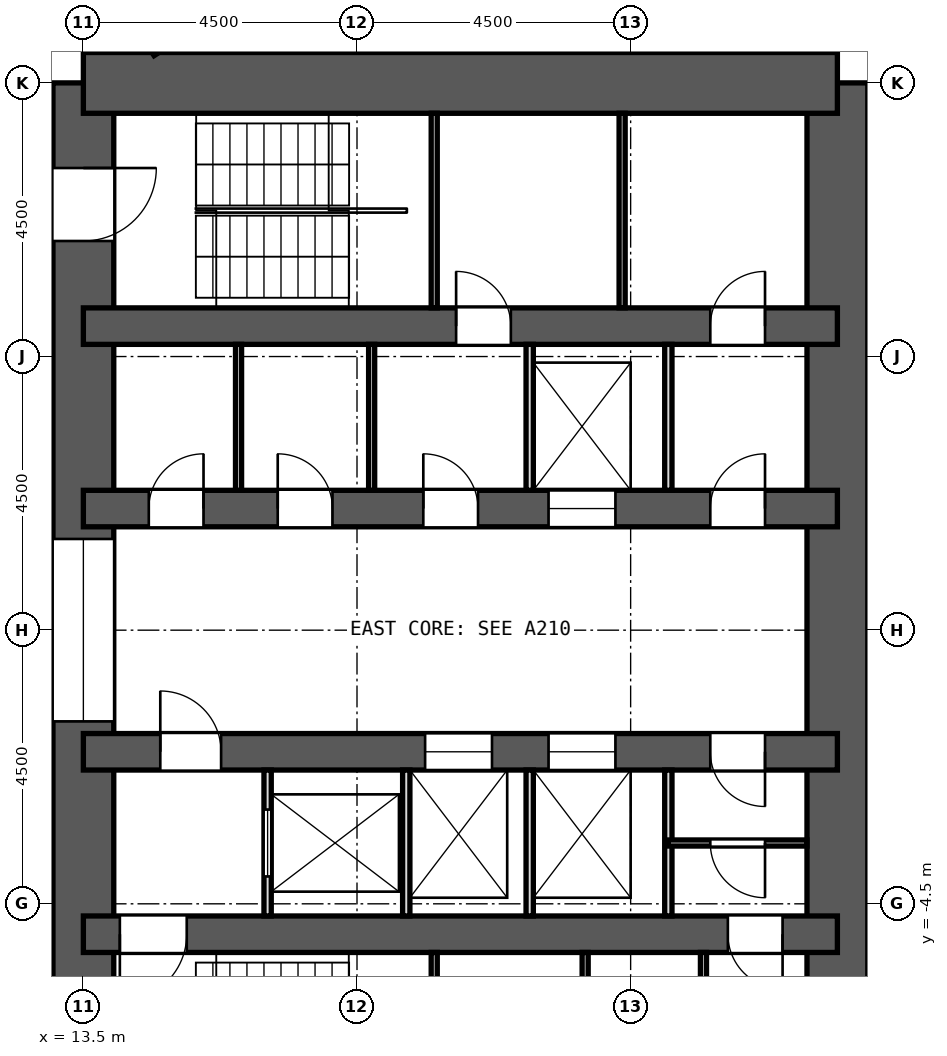
"""IFC4 building model, lengths in metres.
Left out: names, types, materials, properties, quantities, classifications, styles, units other than length and angle.
Written with IfcOpenShell. Run it as: python <this file> out.ifc"""

import sys

from ifc_helpers import new_model, si_unit, direction, frame, frame_2d, origin, place, context, subcontext, project, spatial, rectangle, extrude, element, fill, save


model = new_model("IFC4")
c1 = context("Model", 3, precision=1e-05, world=origin(), true_north=direction((0.0, 1.0)))
c2 = subcontext(c1, "Body", "Model", "MODEL_VIEW")
j1 = project(units=[si_unit("LENGTHUNIT", "METRE"), si_unit("PLANEANGLEUNIT", "RADIAN")], contexts=[c1])
p1 = place(None, origin())
s1 = spatial("IfcSite", under=j1, at=p1, CompositionType="ELEMENT")
p2 = place(p1, origin())
s2 = spatial("IfcBuilding", under=s1, at=p2, CompositionType="ELEMENT")
p3 = place(p2, frame((0.0, 0.0, 36.2)))
s3 = spatial("IfcBuildingStorey", under=s2, at=p3, CompositionType="ELEMENT", Elevation=36.2)
p4 = place(p3, frame((13.5, -9.0, 0.0), z_axis=(0.0, 0.0, 1.0), x_axis=(0.0, 1.0, 0.0)))
e1 = element("IfcWall", 1, at=p4, inside=s3, PredefinedType="SHEAR", context=c2, shape_type="SweptSolid", body=[
    extrude(rectangle(XDim=18.0, YDim=1.0, at=frame_2d((9.0, 0.0))), origin(), (0.0, 0.0, 1.0), 3.3),
])
p5 = place(p4, frame((15.4, 0.0, 0.0)))
e2 = element("IfcOpeningElement", 2, at=p5, cuts=e1, PredefinedType="OPENING", context=c2, shape_type="SweptSolid", body=[
    extrude(rectangle(XDim=1.2, YDim=2.1, at=frame_2d((0.6, 1.05))), frame((0.0, 0.512, 0.0), z_axis=(0.0, -1.0, 0.0), x_axis=(1.0, 0.0, 0.0)), (0.0, 0.0, 1.0), 1.024),
])
p6 = place(p4, frame((1.4, 0.0, 0.0)))
e3 = element("IfcOpeningElement", 3, at=p6, cuts=e1, PredefinedType="OPENING", context=c2, shape_type="SweptSolid", body=[
    extrude(rectangle(XDim=1.2, YDim=2.1, at=frame_2d((0.6, 1.05))), frame((0.0, 0.512, 0.0), z_axis=(0.0, -1.0, 0.0), x_axis=(1.0, 0.0, 0.0)), (0.0, 0.0, 1.0), 1.024),
])
p7 = place(p4, frame((7.5, 0.0, 0.0)))
e4 = element("IfcOpeningElement", 4, at=p7, cuts=e1, PredefinedType="OPENING", context=c2, shape_type="SweptSolid", body=[
    extrude(rectangle(XDim=3.0, YDim=2.4, at=frame_2d((1.5, 1.2))), frame((0.0, 0.512, 0.0), z_axis=(0.0, -1.0, 0.0), x_axis=(1.0, 0.0, 0.0)), (0.0, 0.0, 1.0), 1.024),
])
p8 = place(p3, frame((25.9, -9.0, 0.0), z_axis=(0.0, 0.0, 1.0), x_axis=(0.0, 1.0, 0.0)))
e5 = element("IfcWall", 5, at=p8, inside=s3, PredefinedType="SHEAR", context=c2, shape_type="SweptSolid", body=[
    extrude(rectangle(XDim=18.0, YDim=1.0, at=frame_2d((9.0, 0.0))), origin(), (0.0, 0.0, 1.0), 3.3),
])
p9 = place(p3, frame((13.5, 9.0, 0.0), z_axis=(0.0, 0.0, 1.0), x_axis=(1.0, 0.0, 0.0)))
e6 = element("IfcWall", 6, at=p9, inside=s3, PredefinedType="SHEAR", context=c2, shape_type="SweptSolid", body=[
    extrude(rectangle(XDim=12.4, YDim=1.0, at=frame_2d((6.2, 0.0))), origin(), (0.0, 0.0, 1.0), 3.3),
])
p10 = place(p3, frame((13.5, 5.0, 0.0), z_axis=(0.0, 0.0, 1.0), x_axis=(1.0, 0.0, 0.0)))
e7 = element("IfcWall", 7, at=p10, inside=s3, PredefinedType="SHEAR", context=c2, shape_type="SweptSolid", body=[
    extrude(rectangle(XDim=12.4, YDim=0.6, at=frame_2d((6.2, 0.0))), origin(), (0.0, 0.0, 1.0), 3.3),
])
p11 = place(p10, frame((6.13, 0.0, 0.0)))
e8 = element("IfcOpeningElement", 8, at=p11, cuts=e7, PredefinedType="OPENING", context=c2, shape_type="SweptSolid", body=[
    extrude(rectangle(XDim=0.9, YDim=2.1, at=frame_2d((0.45, 1.05))), frame((0.0, 0.312, 0.0), z_axis=(0.0, -1.0, 0.0), x_axis=(1.0, 0.0, 0.0)), (0.0, 0.0, 1.0), 0.624),
])
p12 = place(p10, frame((10.31, 0.0, 0.0)))
e9 = element("IfcOpeningElement", 9, at=p12, cuts=e7, PredefinedType="OPENING", context=c2, shape_type="SweptSolid", body=[
    extrude(rectangle(XDim=0.9, YDim=2.1, at=frame_2d((0.45, 1.05))), frame((0.0, 0.312, 0.0), z_axis=(0.0, -1.0, 0.0), x_axis=(1.0, 0.0, 0.0)), (0.0, 0.0, 1.0), 0.624),
])
p13 = place(p3, frame((13.5, -5.0, 0.0), z_axis=(0.0, 0.0, 1.0), x_axis=(1.0, 0.0, 0.0)))
e10 = element("IfcWall", 10, at=p13, inside=s3, PredefinedType="SHEAR", context=c2, shape_type="SweptSolid", body=[
    extrude(rectangle(XDim=12.4, YDim=0.6, at=frame_2d((6.2, 0.0))), origin(), (0.0, 0.0, 1.0), 3.3),
])
p14 = place(p13, frame((10.599, 0.0, 0.0)))
e11 = element("IfcOpeningElement", 11, at=p14, cuts=e10, PredefinedType="OPENING", context=c2, shape_type="SweptSolid", body=[
    extrude(rectangle(XDim=0.9, YDim=2.1, at=frame_2d((0.45, 1.05))), frame((0.0, 0.312, 0.0), z_axis=(0.0, -1.0, 0.0), x_axis=(1.0, 0.0, 0.0)), (0.0, 0.0, 1.0), 0.624),
])
p15 = place(p13, frame((0.6, 0.0, 0.0)))
e12 = element("IfcOpeningElement", 12, at=p15, cuts=e10, PredefinedType="OPENING", context=c2, shape_type="SweptSolid", body=[
    extrude(rectangle(XDim=1.1, YDim=2.1, at=frame_2d((0.55, 1.05))), frame((0.0, 0.312, 0.0), z_axis=(0.0, -1.0, 0.0), x_axis=(1.0, 0.0, 0.0)), (0.0, 0.0, 1.0), 0.624),
])
p16 = place(p3, frame((13.5, 2.0, 0.0), z_axis=(0.0, 0.0, 1.0), x_axis=(1.0, 0.0, 0.0)))
e13 = element("IfcWall", 13, at=p16, inside=s3, PredefinedType="SHEAR", context=c2, shape_type="SweptSolid", body=[
    extrude(rectangle(XDim=12.4, YDim=0.6, at=frame_2d((6.2, 0.0))), origin(), (0.0, 0.0, 1.0), 3.3),
])
p17 = place(p16, frame((7.65, 0.0, 0.0)))
e14 = element("IfcOpeningElement", 14, at=p17, cuts=e13, PredefinedType="OPENING", context=c2, shape_type="SweptSolid", body=[
    extrude(rectangle(XDim=1.1, YDim=2.1, at=frame_2d((0.55, 1.05))), frame((0.0, 0.312, 0.0), z_axis=(0.0, -1.0, 0.0), x_axis=(1.0, 0.0, 0.0)), (0.0, 0.0, 1.0), 0.624),
])
p18 = place(p16, frame((1.076, 0.0, 0.0)))
e15 = element("IfcOpeningElement", 15, at=p18, cuts=e13, PredefinedType="OPENING", context=c2, shape_type="SweptSolid", body=[
    extrude(rectangle(XDim=0.9, YDim=2.1, at=frame_2d((0.45, 1.05))), frame((0.0, 0.312, 0.0), z_axis=(0.0, -1.0, 0.0), x_axis=(1.0, 0.0, 0.0)), (0.0, 0.0, 1.0), 0.624),
])
p19 = place(p16, frame((3.196, 0.0, 0.0)))
e16 = element("IfcOpeningElement", 16, at=p19, cuts=e13, PredefinedType="OPENING", context=c2, shape_type="SweptSolid", body=[
    extrude(rectangle(XDim=0.9, YDim=2.1, at=frame_2d((0.45, 1.05))), frame((0.0, 0.312, 0.0), z_axis=(0.0, -1.0, 0.0), x_axis=(1.0, 0.0, 0.0)), (0.0, 0.0, 1.0), 0.624),
])
p20 = place(p16, frame((5.59, 0.0, 0.0)))
e17 = element("IfcOpeningElement", 17, at=p20, cuts=e13, PredefinedType="OPENING", context=c2, shape_type="SweptSolid", body=[
    extrude(rectangle(XDim=0.9, YDim=2.1, at=frame_2d((0.45, 1.05))), frame((0.0, 0.312, 0.0), z_axis=(0.0, -1.0, 0.0), x_axis=(1.0, 0.0, 0.0)), (0.0, 0.0, 1.0), 0.624),
])
p21 = place(p16, frame((10.31, 0.0, 0.0)))
e18 = element("IfcOpeningElement", 18, at=p21, cuts=e13, PredefinedType="OPENING", context=c2, shape_type="SweptSolid", body=[
    extrude(rectangle(XDim=0.9, YDim=2.1, at=frame_2d((0.45, 1.05))), frame((0.0, 0.312, 0.0), z_axis=(0.0, -1.0, 0.0), x_axis=(1.0, 0.0, 0.0)), (0.0, 0.0, 1.0), 0.624),
])
p22 = place(p3, frame((13.5, -2.0, 0.0), z_axis=(0.0, 0.0, 1.0), x_axis=(1.0, 0.0, 0.0)))
e19 = element("IfcWall", 19, at=p22, inside=s3, PredefinedType="SHEAR", context=c2, shape_type="SweptSolid", body=[
    extrude(rectangle(XDim=12.4, YDim=0.6, at=frame_2d((6.2, 0.0))), origin(), (0.0, 0.0, 1.0), 3.3),
])
p23 = place(p22, frame((5.62, 0.0, 0.0)))
e20 = element("IfcOpeningElement", 20, at=p23, cuts=e19, PredefinedType="OPENING", context=c2, shape_type="SweptSolid", body=[
    extrude(rectangle(XDim=1.1, YDim=2.1, at=frame_2d((0.55, 1.05))), frame((0.0, 0.312, 0.0), z_axis=(0.0, -1.0, 0.0), x_axis=(1.0, 0.0, 0.0)), (0.0, 0.0, 1.0), 0.624),
])
p24 = place(p22, frame((7.65, 0.0, 0.0)))
e21 = element("IfcOpeningElement", 21, at=p24, cuts=e19, PredefinedType="OPENING", context=c2, shape_type="SweptSolid", body=[
    extrude(rectangle(XDim=1.1, YDim=2.1, at=frame_2d((0.55, 1.05))), frame((0.0, 0.312, 0.0), z_axis=(0.0, -1.0, 0.0), x_axis=(1.0, 0.0, 0.0)), (0.0, 0.0, 1.0), 0.624),
])
p25 = place(p22, frame((1.265, 0.0, 0.0)))
e22 = element("IfcOpeningElement", 22, at=p25, cuts=e19, PredefinedType="OPENING", context=c2, shape_type="SweptSolid", body=[
    extrude(rectangle(XDim=1.0, YDim=2.1, at=frame_2d((0.5, 1.05))), frame((0.0, 0.312, 0.0), z_axis=(0.0, -1.0, 0.0), x_axis=(1.0, 0.0, 0.0)), (0.0, 0.0, 1.0), 0.624),
])
p26 = place(p22, frame((10.31, 0.0, 0.0)))
e23 = element("IfcOpeningElement", 23, at=p26, cuts=e19, PredefinedType="OPENING", context=c2, shape_type="SweptSolid", body=[
    extrude(rectangle(XDim=0.9, YDim=2.1, at=frame_2d((0.45, 1.05))), frame((0.0, 0.312, 0.0), z_axis=(0.0, -1.0, 0.0), x_axis=(1.0, 0.0, 0.0)), (0.0, 0.0, 1.0), 0.624),
])
p27 = place(p3, frame((27.523, 7.971, 0.0), z_axis=(0.0, 0.0, 1.0), x_axis=(-0.342028474173, 0.939689588564, 0.0)))
e24 = element("IfcWall", 24, at=p27, inside=s3, PredefinedType="SOLIDWALL", context=c2, shape_type="SweptSolid", body=[
    extrude(rectangle(XDim=3.846, YDim=0.6, at=frame_2d((1.923, 0.0))), origin(), (0.0, 0.0, 1.0), 2.75),
])
p28 = place(p3, frame((14.629, 9.5, 0.0), z_axis=(0.0, 0.0, 1.0), x_axis=(0.838764779401, 0.544493934619, 0.0)))
e25 = element("IfcWall", 25, at=p28, inside=s3, PredefinedType="PARTITIONING", context=c2, shape_type="SweptSolid", body=[
    extrude(rectangle(XDim=0.92, YDim=0.125, at=frame_2d((0.46, 0.0))), origin(), (0.0, 0.0, 1.0), 2.75),
])
for number, where, z_axis, x_axis in (
    (26, (16.052, 2.3, 0.0), (0.0, 0.0, 1.0), (0.0, 1.0, 0.0)),
    (27, (18.241, 2.3, 0.0), (0.0, 0.0, 1.0), (0.0, 1.0, 0.0)),
):
    element("IfcWall", number, at=place(p3, frame(where, z_axis=z_axis, x_axis=x_axis)), inside=s3, PredefinedType="PARTITIONING", context=c2, shape_type="SweptSolid", body=[
        extrude(rectangle(XDim=2.4, YDim=0.1, at=frame_2d((1.2, 0.0))), origin(), (0.0, 0.0, 1.0), 2.75),
    ])
for number, where, z_axis, x_axis in (
    (28, (20.84, 2.3, 0.0), (0.0, 0.0, 1.0), (0.0, 1.0, 0.0)),
    (29, (23.12, 2.3, 0.0), (0.0, 0.0, 1.0), (0.0, 1.0, 0.0)),
):
    element("IfcWall", number, at=place(p3, frame(where, z_axis=z_axis, x_axis=x_axis)), inside=s3, PredefinedType="PARTITIONING", context=c2, shape_type="SweptSolid", body=[
        extrude(rectangle(XDim=2.4, YDim=0.12, at=frame_2d((1.2, 0.0))), origin(), (0.0, 0.0, 1.0), 2.75),
    ])
p29 = place(p3, frame((16.53, -4.7, 0.0), z_axis=(0.0, 0.0, 1.0), x_axis=(0.0, 1.0, 0.0)))
e30 = element("IfcWall", 30, at=p29, inside=s3, PredefinedType="PARTITIONING", context=c2, shape_type="SweptSolid", body=[
    extrude(rectangle(XDim=2.4, YDim=0.12, at=frame_2d((1.2, 0.0))), origin(), (0.0, 0.0, 1.0), 2.75),
])
p30 = place(p29, frame((0.65, 0.0, 0.0)))
e31 = element("IfcOpeningElement", 31, at=p30, cuts=e30, PredefinedType="OPENING", context=c2, shape_type="SweptSolid", body=[
    extrude(rectangle(XDim=1.1, YDim=2.1, at=frame_2d((0.55, 1.05))), frame((0.0, 0.072, 0.0), z_axis=(0.0, -1.0, 0.0), x_axis=(1.0, 0.0, 0.0)), (0.0, 0.0, 1.0), 0.144),
])
for number, where, z_axis, x_axis in (
    (32, (18.81, -4.7, 0.0), (0.0, 0.0, 1.0), (0.0, 1.0, 0.0)),
    (33, (20.84, -4.7, 0.0), (0.0, 0.0, 1.0), (0.0, 1.0, 0.0)),
    (34, (23.12, -4.7, 0.0), (0.0, 0.0, 1.0), (0.0, 1.0, 0.0)),
):
    element("IfcWall", number, at=place(p3, frame(where, z_axis=z_axis, x_axis=x_axis)), inside=s3, PredefinedType="PARTITIONING", context=c2, shape_type="SweptSolid", body=[
        extrude(rectangle(XDim=2.4, YDim=0.12, at=frame_2d((1.2, 0.0))), origin(), (0.0, 0.0, 1.0), 2.75),
    ])
p31 = place(p3, frame((23.12, -3.5, 0.0), z_axis=(0.0, 0.0, 1.0), x_axis=(1.0, 0.0, 0.0)))
e35 = element("IfcWall", 35, at=p31, inside=s3, PredefinedType="PARTITIONING", context=c2, shape_type="SweptSolid", body=[
    extrude(rectangle(XDim=2.28, YDim=0.1, at=frame_2d((1.14, 0.0))), origin(), (0.0, 0.0, 1.0), 2.75),
])
p32 = place(p31, frame((0.69, 0.0, 0.0)))
e36 = element("IfcOpeningElement", 36, at=p32, cuts=e35, PredefinedType="OPENING", context=c2, shape_type="SweptSolid", body=[
    extrude(rectangle(XDim=0.9, YDim=2.1, at=frame_2d((0.45, 1.05))), frame((0.0, 0.062, 0.0), z_axis=(0.0, -1.0, 0.0), x_axis=(1.0, 0.0, 0.0)), (0.0, 0.0, 1.0), 0.124),
])
for number, where, z_axis, x_axis in (
    (37, (19.27, 5.3, 0.0), (0.0, 0.0, 1.0), (0.0, 1.0, 0.0)),
    (38, (22.36, 5.3, 0.0), (0.0, 0.0, 1.0), (0.0, 1.0, 0.0)),
    (39, (19.27, -8.5, 0.0), (0.0, 0.0, 1.0), (0.0, 1.0, 0.0)),
):
    element("IfcWall", number, at=place(p3, frame(where, z_axis=z_axis, x_axis=x_axis)), inside=s3, PredefinedType="PARTITIONING", context=c2, shape_type="SweptSolid", body=[
        extrude(rectangle(XDim=3.2, YDim=0.1, at=frame_2d((1.6, 0.0))), origin(), (0.0, 0.0, 1.0), 2.75),
    ])
p33 = place(p3, frame((21.752, -8.5, 0.0), z_axis=(0.0, 0.0, 1.0), x_axis=(0.0, 1.0, 0.0)))
e40 = element("IfcWall", 40, at=p33, inside=s3, PredefinedType="PARTITIONING", context=c2, shape_type="SweptSolid", body=[
    extrude(rectangle(XDim=3.2, YDim=0.1, at=frame_2d((1.6, 0.0))), origin(), (0.0, 0.0, 1.0), 2.75),
])
p34 = place(p33, frame((1.15, 0.0, 0.0)))
e41 = element("IfcOpeningElement", 41, at=p34, cuts=e40, PredefinedType="OPENING", context=c2, shape_type="SweptSolid", body=[
    extrude(rectangle(XDim=0.9, YDim=2.1, at=frame_2d((0.45, 1.05))), frame((0.0, 0.062, 0.0), z_axis=(0.0, -1.0, 0.0), x_axis=(1.0, 0.0, 0.0)), (0.0, 0.0, 1.0), 0.124),
])
p35 = place(p3, frame((23.698, -8.5, 0.0), z_axis=(0.0, 0.0, 1.0), x_axis=(0.0, 1.0, 0.0)))
e42 = element("IfcWall", 42, at=p35, inside=s3, PredefinedType="PARTITIONING", context=c2, shape_type="SweptSolid", body=[
    extrude(rectangle(XDim=3.2, YDim=0.1, at=frame_2d((1.6, 0.0))), origin(), (0.0, 0.0, 1.0), 2.75),
])
p36 = place(p35, frame((1.15, 0.0, 0.0)))
e43 = element("IfcOpeningElement", 43, at=p36, cuts=e42, PredefinedType="OPENING", context=c2, shape_type="SweptSolid", body=[
    extrude(rectangle(XDim=0.9, YDim=2.1, at=frame_2d((0.45, 1.05))), frame((0.0, 0.062, 0.0), z_axis=(0.0, -1.0, 0.0), x_axis=(1.0, 0.0, 0.0)), (0.0, 0.0, 1.0), 0.124),
])
p37 = place(p17, origin())
e44 = element("IfcDoor", 44, at=p37, inside=s3, OperationType="DOUBLE_DOOR_SLIDING", PredefinedType="DOOR", context=c2, shape_type="SweptSolid", body=[
    extrude(rectangle(XDim=1.1, YDim=2.1, at=frame_2d((0.55, 1.05))), frame((0.0, 0.025, 0.0), z_axis=(0.0, -1.0, 0.0), x_axis=(1.0, 0.0, 0.0)), (0.0, 0.0, 1.0), 0.05),
])
fill(e14, e44)
p38 = place(p30, origin())
e45 = element("IfcDoor", 45, at=p38, inside=s3, OperationType="DOUBLE_DOOR_SLIDING", PredefinedType="DOOR", context=c2, shape_type="SweptSolid", body=[
    extrude(rectangle(XDim=1.1, YDim=2.1, at=frame_2d((0.55, 1.05))), frame((0.0, 0.025, 0.0), z_axis=(0.0, -1.0, 0.0), x_axis=(1.0, 0.0, 0.0)), (0.0, 0.0, 1.0), 0.05),
])
fill(e31, e45)
p39 = place(p23, origin())
e46 = element("IfcDoor", 46, at=p39, inside=s3, OperationType="DOUBLE_DOOR_SLIDING", PredefinedType="DOOR", context=c2, shape_type="SweptSolid", body=[
    extrude(rectangle(XDim=1.1, YDim=2.1, at=frame_2d((0.55, 1.05))), frame((0.0, 0.025, 0.0), z_axis=(0.0, -1.0, 0.0), x_axis=(1.0, 0.0, 0.0)), (0.0, 0.0, 1.0), 0.05),
])
fill(e20, e46)
p40 = place(p24, origin())
e47 = element("IfcDoor", 47, at=p40, inside=s3, OperationType="DOUBLE_DOOR_SLIDING", PredefinedType="DOOR", context=c2, shape_type="SweptSolid", body=[
    extrude(rectangle(XDim=1.1, YDim=2.1, at=frame_2d((0.55, 1.05))), frame((0.0, 0.025, 0.0), z_axis=(0.0, -1.0, 0.0), x_axis=(1.0, 0.0, 0.0)), (0.0, 0.0, 1.0), 0.05),
])
fill(e21, e47)
p41 = place(p18, origin())
e48 = element("IfcDoor", 48, at=p41, inside=s3, OperationType="SINGLE_SWING_RIGHT", PredefinedType="DOOR", context=c2, shape_type="SweptSolid", body=[
    extrude(rectangle(XDim=0.9, YDim=2.1, at=frame_2d((0.45, 1.05))), frame((0.0, 0.025, 0.0), z_axis=(0.0, -1.0, 0.0), x_axis=(1.0, 0.0, 0.0)), (0.0, 0.0, 1.0), 0.05),
])
fill(e15, e48)
p42 = place(p19, origin())
e49 = element("IfcDoor", 49, at=p42, inside=s3, OperationType="SINGLE_SWING_LEFT", PredefinedType="DOOR", context=c2, shape_type="SweptSolid", body=[
    extrude(rectangle(XDim=0.9, YDim=2.1, at=frame_2d((0.45, 1.05))), frame((0.0, 0.025, 0.0), z_axis=(0.0, -1.0, 0.0), x_axis=(1.0, 0.0, 0.0)), (0.0, 0.0, 1.0), 0.05),
])
fill(e16, e49)
p43 = place(p20, origin())
e50 = element("IfcDoor", 50, at=p43, inside=s3, OperationType="SINGLE_SWING_LEFT", PredefinedType="DOOR", context=c2, shape_type="SweptSolid", body=[
    extrude(rectangle(XDim=0.9, YDim=2.1, at=frame_2d((0.45, 1.05))), frame((0.0, 0.025, 0.0), z_axis=(0.0, -1.0, 0.0), x_axis=(1.0, 0.0, 0.0)), (0.0, 0.0, 1.0), 0.05),
])
fill(e17, e50)
p44 = place(p21, origin())
e51 = element("IfcDoor", 51, at=p44, inside=s3, OperationType="SINGLE_SWING_RIGHT", PredefinedType="DOOR", context=c2, shape_type="SweptSolid", body=[
    extrude(rectangle(XDim=0.9, YDim=2.1, at=frame_2d((0.45, 1.05))), frame((0.0, 0.025, 0.0), z_axis=(0.0, -1.0, 0.0), x_axis=(1.0, 0.0, 0.0)), (0.0, 0.0, 1.0), 0.05),
])
fill(e18, e51)
p45 = place(p25, origin())
e52 = element("IfcDoor", 52, at=p45, inside=s3, OperationType="SINGLE_SWING_LEFT", PredefinedType="DOOR", context=c2, shape_type="SweptSolid", body=[
    extrude(rectangle(XDim=1.0, YDim=2.1, at=frame_2d((0.5, 1.05))), frame((0.0, 0.025, 0.0), z_axis=(0.0, -1.0, 0.0), x_axis=(1.0, 0.0, 0.0)), (0.0, 0.0, 1.0), 0.05),
])
fill(e22, e52)
p46 = place(p26, frame((0.9, 0.0, 0.0), z_axis=(0.0, 0.0, 1.0), x_axis=(-1.0, 0.0, 0.0)))
e53 = element("IfcDoor", 53, at=p46, inside=s3, OperationType="SINGLE_SWING_LEFT", PredefinedType="DOOR", context=c2, shape_type="SweptSolid", body=[
    extrude(rectangle(XDim=0.9, YDim=2.1, at=frame_2d((0.45, 1.05))), frame((0.0, 0.025, 0.0), z_axis=(0.0, -1.0, 0.0), x_axis=(1.0, 0.0, 0.0)), (0.0, 0.0, 1.0), 0.05),
])
fill(e23, e53)
p47 = place(p11, origin())
e54 = element("IfcDoor", 54, at=p47, inside=s3, OperationType="SINGLE_SWING_LEFT", PredefinedType="DOOR", context=c2, shape_type="SweptSolid", body=[
    extrude(rectangle(XDim=0.9, YDim=2.1, at=frame_2d((0.45, 1.05))), frame((0.0, 0.025, 0.0), z_axis=(0.0, -1.0, 0.0), x_axis=(1.0, 0.0, 0.0)), (0.0, 0.0, 1.0), 0.05),
])
fill(e8, e54)
p48 = place(p12, origin())
e55 = element("IfcDoor", 55, at=p48, inside=s3, OperationType="SINGLE_SWING_RIGHT", PredefinedType="DOOR", context=c2, shape_type="SweptSolid", body=[
    extrude(rectangle(XDim=0.9, YDim=2.1, at=frame_2d((0.45, 1.05))), frame((0.0, 0.025, 0.0), z_axis=(0.0, -1.0, 0.0), x_axis=(1.0, 0.0, 0.0)), (0.0, 0.0, 1.0), 0.05),
])
fill(e9, e55)
p49 = place(p32, frame((0.9, 0.0, 0.0), z_axis=(0.0, 0.0, 1.0), x_axis=(-1.0, 0.0, 0.0)))
e56 = element("IfcDoor", 56, at=p49, inside=s3, OperationType="SINGLE_SWING_LEFT", PredefinedType="DOOR", context=c2, shape_type="SweptSolid", body=[
    extrude(rectangle(XDim=0.9, YDim=2.1, at=frame_2d((0.45, 1.05))), frame((0.0, 0.025, 0.0), z_axis=(0.0, -1.0, 0.0), x_axis=(1.0, 0.0, 0.0)), (0.0, 0.0, 1.0), 0.05),
])
fill(e36, e56)
p50 = place(p14, frame((0.9, 0.0, 0.0), z_axis=(0.0, 0.0, 1.0), x_axis=(-1.0, 0.0, 0.0)))
e57 = element("IfcDoor", 57, at=p50, inside=s3, OperationType="SINGLE_SWING_LEFT", PredefinedType="DOOR", context=c2, shape_type="SweptSolid", body=[
    extrude(rectangle(XDim=0.9, YDim=2.1, at=frame_2d((0.45, 1.05))), frame((0.0, 0.025, 0.0), z_axis=(0.0, -1.0, 0.0), x_axis=(1.0, 0.0, 0.0)), (0.0, 0.0, 1.0), 0.05),
])
fill(e11, e57)
p51 = place(p15, frame((1.1, 0.0, 0.0), z_axis=(0.0, 0.0, 1.0), x_axis=(-1.0, 0.0, 0.0)))
e58 = element("IfcDoor", 58, at=p51, inside=s3, OperationType="SINGLE_SWING_RIGHT", PredefinedType="DOOR", context=c2, shape_type="SweptSolid", body=[
    extrude(rectangle(XDim=1.1, YDim=2.1, at=frame_2d((0.55, 1.05))), frame((0.0, 0.025, 0.0), z_axis=(0.0, -1.0, 0.0), x_axis=(1.0, 0.0, 0.0)), (0.0, 0.0, 1.0), 0.05),
])
fill(e12, e58)
p52 = place(p5, frame((1.2, 0.0, 0.0), z_axis=(0.0, 0.0, 1.0), x_axis=(-1.0, 0.0, 0.0)))
e59 = element("IfcDoor", 59, at=p52, inside=s3, OperationType="SINGLE_SWING_LEFT", PredefinedType="DOOR", context=c2, shape_type="SweptSolid", body=[
    extrude(rectangle(XDim=1.2, YDim=2.1, at=frame_2d((0.6, 1.05))), frame((0.0, 0.025, 0.0), z_axis=(0.0, -1.0, 0.0), x_axis=(1.0, 0.0, 0.0)), (0.0, 0.0, 1.0), 0.05),
])
fill(e2, e59)
p53 = place(p7, origin())
e60 = element("IfcDoor", 60, at=p53, inside=s3, OperationType="DOUBLE_DOOR_SLIDING", PredefinedType="DOOR", context=c2, shape_type="SweptSolid", body=[
    extrude(rectangle(XDim=3.0, YDim=2.4, at=frame_2d((1.5, 1.2))), frame((0.0, 0.025, 0.0), z_axis=(0.0, -1.0, 0.0), x_axis=(1.0, 0.0, 0.0)), (0.0, 0.0, 1.0), 0.05),
])
fill(e4, e60)
save(model, sys.argv[1])
